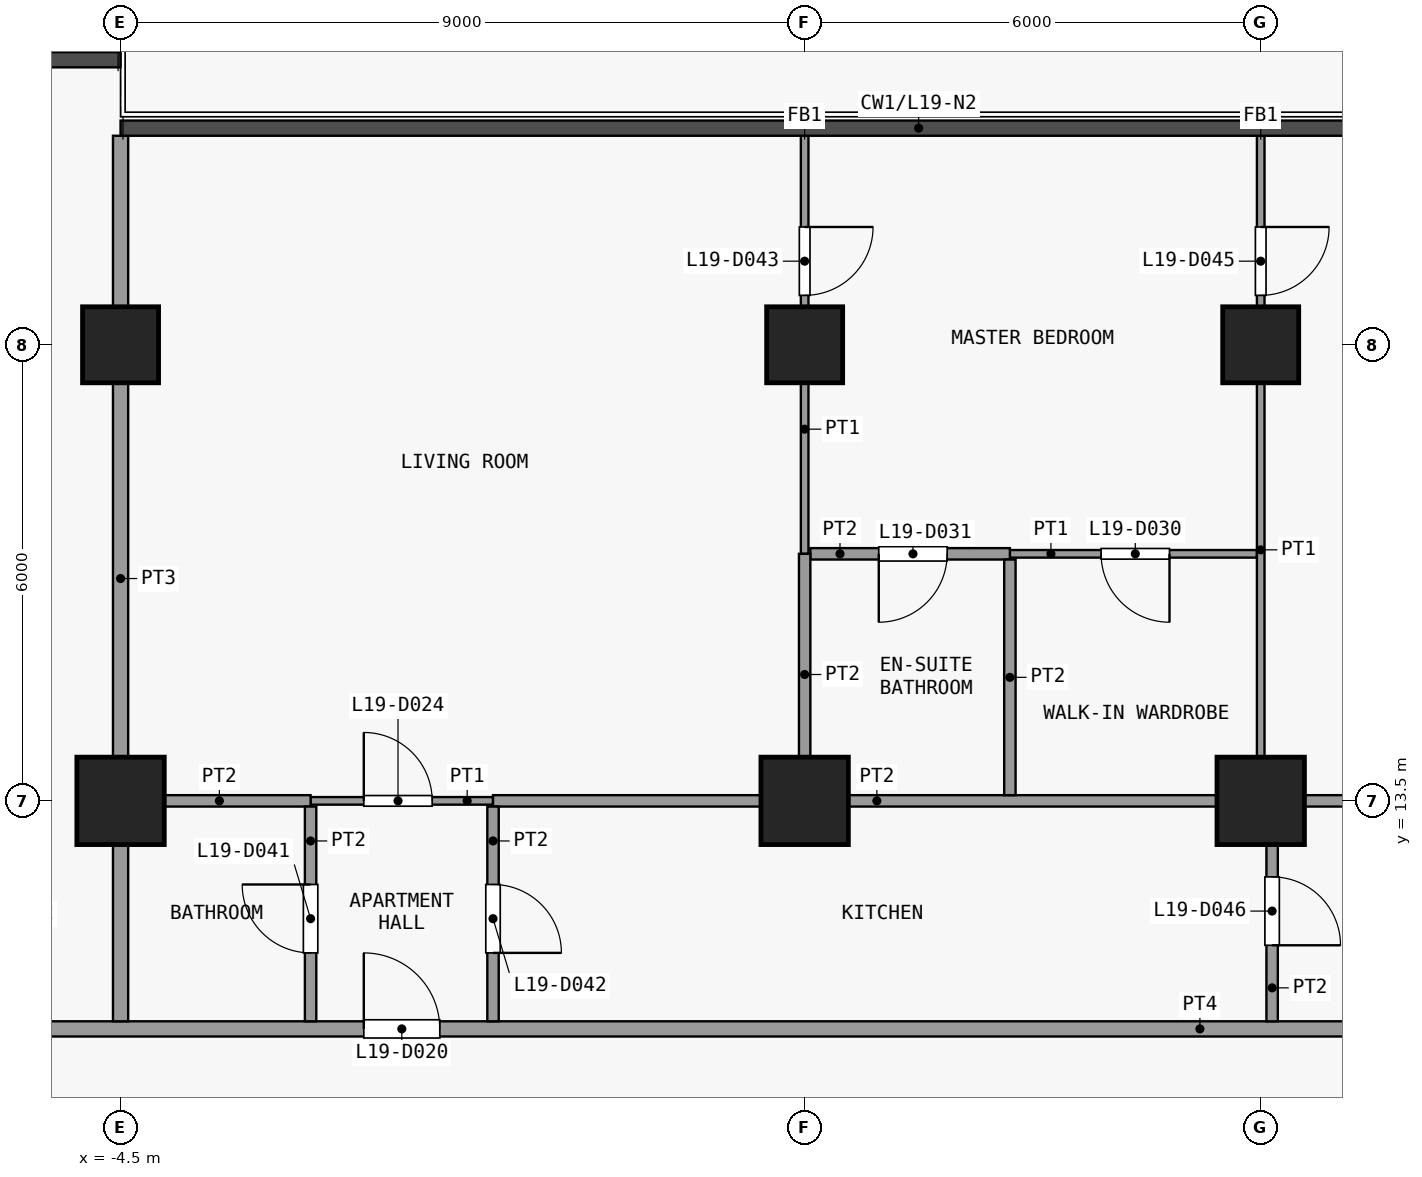
"""IFC4 building model, lengths in metres.
Left out: names, types, materials, properties, quantities, classifications, styles, units other than length and angle.
Written with IfcOpenShell. Run it as: python <this file> out.ifc"""

import sys

from ifc_helpers import new_model, si_unit, direction, frame, frame_2d, origin, origin_2d, place, context, subcontext, project, spatial, rectangle, extrude, element, fill, save


model = new_model("IFC4")
c1 = context("Model", 3, precision=1e-05, world=origin(), true_north=direction((0.0, 1.0)))
c2 = subcontext(c1, "Body", "Model", "MODEL_VIEW")
j1 = project(units=[si_unit("LENGTHUNIT", "METRE"), si_unit("PLANEANGLEUNIT", "RADIAN")], contexts=[c1])
p1 = place(None, origin())
s1 = spatial("IfcSite", under=j1, at=p1, CompositionType="ELEMENT")
p2 = place(p1, origin())
s2 = spatial("IfcBuilding", under=s1, at=p2, CompositionType="ELEMENT")
p3 = place(p2, frame((0.0, 0.0, 81.1)))
s3 = spatial("IfcBuildingStorey", under=s2, at=p3, CompositionType="ELEMENT", Elevation=81.1)
p4 = place(p3, frame((-4.5, 13.5, 0.0), z_axis=(0.0, 0.0, 1.0), x_axis=(1.0, 0.0, 0.0)))
e1 = element("IfcColumn", 1, at=p4, inside=s3, PredefinedType="COLUMN", context=c2, shape_type="SweptSolid", body=[
    extrude(rectangle(XDim=1.15, YDim=1.15, at=origin_2d()), origin(), (0.0, 0.0, 1.0), 3.6),
])
p5 = place(p3, frame((-4.5, 19.5, 0.0), z_axis=(0.0, 0.0, 1.0), x_axis=(1.0, 0.0, 0.0)))
e2 = element("IfcColumn", 2, at=p5, inside=s3, PredefinedType="COLUMN", context=c2, shape_type="SweptSolid", body=[
    extrude(rectangle(XDim=1.0, YDim=1.0, at=origin_2d()), origin(), (0.0, 0.0, 1.0), 3.6),
])
p6 = place(p3, frame((4.5, 13.5, 0.0), z_axis=(0.0, 0.0, 1.0), x_axis=(1.0, 0.0, 0.0)))
e3 = element("IfcColumn", 3, at=p6, inside=s3, PredefinedType="COLUMN", context=c2, shape_type="SweptSolid", body=[
    extrude(rectangle(XDim=1.15, YDim=1.15, at=origin_2d()), origin(), (0.0, 0.0, 1.0), 3.6),
])
p7 = place(p3, frame((4.5, 19.5, 0.0), z_axis=(0.0, 0.0, 1.0), x_axis=(1.0, 0.0, 0.0)))
e4 = element("IfcColumn", 4, at=p7, inside=s3, PredefinedType="COLUMN", context=c2, shape_type="SweptSolid", body=[
    extrude(rectangle(XDim=1.0, YDim=1.0, at=origin_2d()), origin(), (0.0, 0.0, 1.0), 3.6),
])
p8 = place(p3, frame((10.5, 13.5, 0.0), z_axis=(0.0, 0.0, 1.0), x_axis=(1.0, 0.0, 0.0)))
e5 = element("IfcColumn", 5, at=p8, inside=s3, PredefinedType="COLUMN", context=c2, shape_type="SweptSolid", body=[
    extrude(rectangle(XDim=1.15, YDim=1.15, at=origin_2d()), origin(), (0.0, 0.0, 1.0), 3.6),
])
p9 = place(p3, frame((10.5, 19.5, 0.0), z_axis=(0.0, 0.0, 1.0), x_axis=(1.0, 0.0, 0.0)))
e6 = element("IfcColumn", 6, at=p9, inside=s3, PredefinedType="COLUMN", context=c2, shape_type="SweptSolid", body=[
    extrude(rectangle(XDim=1.0, YDim=1.0, at=origin_2d()), origin(), (0.0, 0.0, 1.0), 3.6),
])
p10 = place(p3, frame((-23.85, 10.5, 0.0), z_axis=(0.0, 0.0, 1.0), x_axis=(1.0, 0.0, 0.0)))
e7 = element("IfcWall", 7, at=p10, inside=s3, PredefinedType="PARTITIONING", context=c2, shape_type="SweptSolid", body=[
    extrude(rectangle(XDim=49.2, YDim=0.2, at=frame_2d((24.6, 0.0))), origin(), (0.0, 0.0, 1.0), 3.3),
])
p11 = place(p10, frame((5.55, 0.0, 0.0)))
e8 = element("IfcOpeningElement", 8, at=p11, cuts=e7, PredefinedType="OPENING", context=c2, shape_type="SweptSolid", body=[
    extrude(rectangle(XDim=1.0, YDim=2.1, at=frame_2d((0.5, 1.05))), frame((0.0, 0.11, 0.0), z_axis=(0.0, -1.0, 0.0), x_axis=(1.0, 0.0, 0.0)), (0.0, 0.0, 1.0), 0.22),
])
p12 = place(p10, frame((14.05, 0.0, 0.0)))
e9 = element("IfcOpeningElement", 9, at=p12, cuts=e7, PredefinedType="OPENING", context=c2, shape_type="SweptSolid", body=[
    extrude(rectangle(XDim=1.0, YDim=2.1, at=frame_2d((0.5, 1.05))), frame((0.0, 0.11, 0.0), z_axis=(0.0, -1.0, 0.0), x_axis=(1.0, 0.0, 0.0)), (0.0, 0.0, 1.0), 0.22),
])
p13 = place(p10, frame((22.55, 0.0, 0.0)))
e10 = element("IfcOpeningElement", 10, at=p13, cuts=e7, PredefinedType="OPENING", context=c2, shape_type="SweptSolid", body=[
    extrude(rectangle(XDim=1.0, YDim=2.1, at=frame_2d((0.5, 1.05))), frame((0.0, 0.11, 0.0), z_axis=(0.0, -1.0, 0.0), x_axis=(1.0, 0.0, 0.0)), (0.0, 0.0, 1.0), 0.22),
])
p14 = place(p10, frame((43.55, 0.0, 0.0)))
e11 = element("IfcOpeningElement", 11, at=p14, cuts=e7, PredefinedType="OPENING", context=c2, shape_type="SweptSolid", body=[
    extrude(rectangle(XDim=1.0, YDim=2.1, at=frame_2d((0.5, 1.05))), frame((0.0, 0.11, 0.0), z_axis=(0.0, -1.0, 0.0), x_axis=(1.0, 0.0, 0.0)), (0.0, 0.0, 1.0), 0.22),
])
p15 = place(p3, frame((-2.0, 13.5, 0.0), z_axis=(0.0, 0.0, 1.0), x_axis=(1.0, 0.0, 0.0)))
e12 = element("IfcWall", 12, at=p15, inside=s3, PredefinedType="PARTITIONING", context=c2, shape_type="SweptSolid", body=[
    extrude(rectangle(XDim=2.4, YDim=0.1, at=frame_2d((1.2, 0.0))), origin(), (0.0, 0.0, 1.0), 3.3),
])
p16 = place(p15, frame((0.7, 0.0, 0.0)))
e13 = element("IfcOpeningElement", 13, at=p16, cuts=e12, PredefinedType="OPENING", context=c2, shape_type="SweptSolid", body=[
    extrude(rectangle(XDim=0.9, YDim=2.1, at=frame_2d((0.45, 1.05))), frame((0.0, 0.06, 0.0), z_axis=(0.0, -1.0, 0.0), x_axis=(1.0, 0.0, 0.0)), (0.0, 0.0, 1.0), 0.12),
])
p17 = place(p3, frame((-4.4, 13.5, 0.0), z_axis=(0.0, 0.0, 1.0), x_axis=(1.0, 0.0, 0.0)))
e14 = element("IfcWall", 14, at=p17, inside=s3, PredefinedType="PARTITIONING", context=c2, shape_type="SweptSolid", body=[
    extrude(rectangle(XDim=2.4, YDim=0.15, at=frame_2d((1.2, 0.0))), origin(), (0.0, 0.0, 1.0), 3.3),
])
p18 = place(p3, frame((0.4, 13.5, 0.0), z_axis=(0.0, 0.0, 1.0), x_axis=(1.0, 0.0, 0.0)))
e15 = element("IfcWall", 15, at=p18, inside=s3, PredefinedType="PARTITIONING", context=c2, shape_type="SweptSolid", body=[
    extrude(rectangle(XDim=10.1, YDim=0.15, at=frame_2d((5.05, 0.0))), origin(), (0.0, 0.0, 1.0), 3.3),
])
p19 = place(p3, frame((10.65, 13.5, 0.0), z_axis=(0.0, 0.0, 1.0), x_axis=(1.0, 0.0, 0.0)))
e16 = element("IfcWall", 16, at=p19, inside=s3, PredefinedType="PARTITIONING", context=c2, shape_type="SweptSolid", body=[
    extrude(rectangle(XDim=8.35, YDim=0.15, at=frame_2d((4.175, 0.0))), origin(), (0.0, 0.0, 1.0), 3.3),
])
p20 = place(p3, frame((7.2, 16.75, 0.0), z_axis=(0.0, 0.0, 1.0), x_axis=(1.0, 0.0, 0.0)))
e17 = element("IfcWall", 17, at=p20, inside=s3, PredefinedType="PARTITIONING", context=c2, shape_type="SweptSolid", body=[
    extrude(rectangle(XDim=3.25, YDim=0.1, at=frame_2d((1.625, 0.0))), origin(), (0.0, 0.0, 1.0), 3.3),
])
p21 = place(p20, frame((1.2, 0.0, 0.0)))
e18 = element("IfcOpeningElement", 18, at=p21, cuts=e17, PredefinedType="OPENING", context=c2, shape_type="SweptSolid", body=[
    extrude(rectangle(XDim=0.9, YDim=2.1, at=frame_2d((0.45, 1.05))), frame((0.0, 0.06, 0.0), z_axis=(0.0, -1.0, 0.0), x_axis=(1.0, 0.0, 0.0)), (0.0, 0.0, 1.0), 0.12),
])
p22 = place(p3, frame((4.575, 16.75, 0.0), z_axis=(0.0, 0.0, 1.0), x_axis=(1.0, 0.0, 0.0)))
e19 = element("IfcWall", 19, at=p22, inside=s3, PredefinedType="PARTITIONING", context=c2, shape_type="SweptSolid", body=[
    extrude(rectangle(XDim=2.625, YDim=0.15, at=frame_2d((1.312, 0.0))), origin(), (0.0, 0.0, 1.0), 3.3),
])
p23 = place(p22, frame((0.9, 0.0, 0.0)))
e20 = element("IfcOpeningElement", 20, at=p23, cuts=e19, PredefinedType="OPENING", context=c2, shape_type="SweptSolid", body=[
    extrude(rectangle(XDim=0.9, YDim=2.1, at=frame_2d((0.45, 1.05))), frame((0.0, 0.085, 0.0), z_axis=(0.0, -1.0, 0.0), x_axis=(1.0, 0.0, 0.0)), (0.0, 0.0, 1.0), 0.17),
])
p24 = place(p3, frame((-4.5, 10.6, 0.0), z_axis=(0.0, 0.0, 1.0), x_axis=(0.0, 1.0, 0.0)))
e21 = element("IfcWall", 21, at=p24, inside=s3, PredefinedType="PARTITIONING", context=c2, shape_type="SweptSolid", body=[
    extrude(rectangle(XDim=11.65, YDim=0.2, at=frame_2d((5.825, 0.0))), origin(), (0.0, 0.0, 1.0), 3.3),
])
p25 = place(p3, frame((-2.0, 10.6, 0.0), z_axis=(0.0, 0.0, 1.0), x_axis=(0.0, 1.0, 0.0)))
e22 = element("IfcWall", 22, at=p25, inside=s3, PredefinedType="PARTITIONING", context=c2, shape_type="SweptSolid", body=[
    extrude(rectangle(XDim=2.825, YDim=0.15, at=frame_2d((1.413, 0.0))), origin(), (0.0, 0.0, 1.0), 3.3),
])
p26 = place(p25, frame((0.9, 0.0, 0.0)))
e23 = element("IfcOpeningElement", 23, at=p26, cuts=e22, PredefinedType="OPENING", context=c2, shape_type="SweptSolid", body=[
    extrude(rectangle(XDim=0.9, YDim=2.1, at=frame_2d((0.45, 1.05))), frame((0.0, 0.085, 0.0), z_axis=(0.0, -1.0, 0.0), x_axis=(1.0, 0.0, 0.0)), (0.0, 0.0, 1.0), 0.17),
])
p27 = place(p3, frame((0.4, 10.6, 0.0), z_axis=(0.0, 0.0, 1.0), x_axis=(0.0, 1.0, 0.0)))
e24 = element("IfcWall", 24, at=p27, inside=s3, PredefinedType="PARTITIONING", context=c2, shape_type="SweptSolid", body=[
    extrude(rectangle(XDim=2.825, YDim=0.15, at=frame_2d((1.413, 0.0))), origin(), (0.0, 0.0, 1.0), 3.3),
])
p28 = place(p27, frame((0.9, 0.0, 0.0)))
e25 = element("IfcOpeningElement", 25, at=p28, cuts=e24, PredefinedType="OPENING", context=c2, shape_type="SweptSolid", body=[
    extrude(rectangle(XDim=0.9, YDim=2.1, at=frame_2d((0.45, 1.05))), frame((0.0, 0.085, 0.0), z_axis=(0.0, -1.0, 0.0), x_axis=(1.0, 0.0, 0.0)), (0.0, 0.0, 1.0), 0.17),
])
p29 = place(p3, frame((4.5, 16.75, 0.0), z_axis=(0.0, 0.0, 1.0), x_axis=(0.0, 1.0, 0.0)))
e26 = element("IfcWall", 26, at=p29, inside=s3, PredefinedType="PARTITIONING", context=c2, shape_type="SweptSolid", body=[
    extrude(rectangle(XDim=5.5, YDim=0.1, at=frame_2d((2.75, 0.0))), origin(), (0.0, 0.0, 1.0), 3.3),
])
p30 = place(p29, frame((3.4, 0.0, 0.0)))
e27 = element("IfcOpeningElement", 27, at=p30, cuts=e26, PredefinedType="OPENING", context=c2, shape_type="SweptSolid", body=[
    extrude(rectangle(XDim=0.9, YDim=2.1, at=frame_2d((0.45, 1.05))), frame((0.0, 0.06, 0.0), z_axis=(0.0, -1.0, 0.0), x_axis=(1.0, 0.0, 0.0)), (0.0, 0.0, 1.0), 0.12),
])
p31 = place(p3, frame((4.5, 13.575, 0.0), z_axis=(0.0, 0.0, 1.0), x_axis=(0.0, 1.0, 0.0)))
e28 = element("IfcWall", 28, at=p31, inside=s3, PredefinedType="PARTITIONING", context=c2, shape_type="SweptSolid", body=[
    extrude(rectangle(XDim=3.175, YDim=0.15, at=frame_2d((1.587, 0.0))), origin(), (0.0, 0.0, 1.0), 3.3),
])
p32 = place(p3, frame((7.2, 13.575, 0.0), z_axis=(0.0, 0.0, 1.0), x_axis=(0.0, 1.0, 0.0)))
e29 = element("IfcWall", 29, at=p32, inside=s3, PredefinedType="PARTITIONING", context=c2, shape_type="SweptSolid", body=[
    extrude(rectangle(XDim=3.1, YDim=0.15, at=frame_2d((1.55, 0.0))), origin(), (0.0, 0.0, 1.0), 3.3),
])
p33 = place(p3, frame((10.5, 13.575, 0.0), z_axis=(0.0, 0.0, 1.0), x_axis=(0.0, 1.0, 0.0)))
e30 = element("IfcWall", 30, at=p33, inside=s3, PredefinedType="PARTITIONING", context=c2, shape_type="SweptSolid", body=[
    extrude(rectangle(XDim=8.675, YDim=0.1, at=frame_2d((4.337, 0.0))), origin(), (0.0, 0.0, 1.0), 3.3),
])
p34 = place(p33, frame((6.575, 0.0, 0.0)))
e31 = element("IfcOpeningElement", 31, at=p34, cuts=e30, PredefinedType="OPENING", context=c2, shape_type="SweptSolid", body=[
    extrude(rectangle(XDim=0.9, YDim=2.1, at=frame_2d((0.45, 1.05))), frame((0.0, 0.06, 0.0), z_axis=(0.0, -1.0, 0.0), x_axis=(1.0, 0.0, 0.0)), (0.0, 0.0, 1.0), 0.12),
])
p35 = place(p3, frame((10.65, 10.6, 0.0), z_axis=(0.0, 0.0, 1.0), x_axis=(0.0, 1.0, 0.0)))
e32 = element("IfcWall", 32, at=p35, inside=s3, PredefinedType="PARTITIONING", context=c2, shape_type="SweptSolid", body=[
    extrude(rectangle(XDim=2.825, YDim=0.15, at=frame_2d((1.413, 0.0))), origin(), (0.0, 0.0, 1.0), 3.3),
])
p36 = place(p35, frame((1.0, 0.0, 0.0)))
e33 = element("IfcOpeningElement", 33, at=p36, cuts=e32, PredefinedType="OPENING", context=c2, shape_type="SweptSolid", body=[
    extrude(rectangle(XDim=0.9, YDim=2.1, at=frame_2d((0.45, 1.05))), frame((0.0, 0.085, 0.0), z_axis=(0.0, -1.0, 0.0), x_axis=(1.0, 0.0, 0.0)), (0.0, 0.0, 1.0), 0.17),
])
p37 = place(p13, origin())
e34 = element("IfcDoor", 34, at=p37, inside=s3, OperationType="SINGLE_SWING_RIGHT", PredefinedType="DOOR", context=c2, shape_type="SweptSolid", body=[
    extrude(rectangle(XDim=1.0, YDim=2.1, at=frame_2d((0.5, 1.05))), frame((0.0, 0.025, 0.0), z_axis=(0.0, -1.0, 0.0), x_axis=(1.0, 0.0, 0.0)), (0.0, 0.0, 1.0), 0.05),
])
fill(e10, e34)
p38 = place(p16, origin())
e35 = element("IfcDoor", 35, at=p38, inside=s3, OperationType="SINGLE_SWING_RIGHT", PredefinedType="DOOR", context=c2, shape_type="SweptSolid", body=[
    extrude(rectangle(XDim=0.9, YDim=2.1, at=frame_2d((0.45, 1.05))), frame((0.0, 0.025, 0.0), z_axis=(0.0, -1.0, 0.0), x_axis=(1.0, 0.0, 0.0)), (0.0, 0.0, 1.0), 0.05),
])
fill(e13, e35)
p39 = place(p21, origin())
e36 = element("IfcDoor", 36, at=p39, inside=s3, OperationType="SINGLE_SWING_RIGHT", PredefinedType="DOOR", context=c2, shape_type="SweptSolid", body=[
    extrude(rectangle(XDim=0.9, YDim=2.1, at=frame_2d((0.45, 1.05))), frame((0.0, 0.025, 0.0), z_axis=(0.0, -1.0, 0.0), x_axis=(1.0, 0.0, 0.0)), (0.0, 0.0, 1.0), 0.05),
])
fill(e18, e36)
p40 = place(p23, origin())
e37 = element("IfcDoor", 37, at=p40, inside=s3, OperationType="SINGLE_SWING_LEFT", PredefinedType="DOOR", context=c2, shape_type="SweptSolid", body=[
    extrude(rectangle(XDim=0.9, YDim=2.1, at=frame_2d((0.45, 1.05))), frame((0.0, 0.025, 0.0), z_axis=(0.0, -1.0, 0.0), x_axis=(1.0, 0.0, 0.0)), (0.0, 0.0, 1.0), 0.05),
])
fill(e20, e37)
p41 = place(p26, origin())
e38 = element("IfcDoor", 38, at=p41, inside=s3, OperationType="SINGLE_SWING_LEFT", PredefinedType="DOOR", context=c2, shape_type="SweptSolid", body=[
    extrude(rectangle(XDim=0.9, YDim=2.1, at=frame_2d((0.45, 1.05))), frame((0.0, 0.025, 0.0), z_axis=(0.0, -1.0, 0.0), x_axis=(1.0, 0.0, 0.0)), (0.0, 0.0, 1.0), 0.05),
])
fill(e23, e38)
p42 = place(p28, origin())
e39 = element("IfcDoor", 39, at=p42, inside=s3, OperationType="SINGLE_SWING_LEFT", PredefinedType="DOOR", context=c2, shape_type="SweptSolid", body=[
    extrude(rectangle(XDim=0.9, YDim=2.1, at=frame_2d((0.45, 1.05))), frame((0.0, 0.025, 0.0), z_axis=(0.0, -1.0, 0.0), x_axis=(1.0, 0.0, 0.0)), (0.0, 0.0, 1.0), 0.05),
])
fill(e25, e39)
p43 = place(p30, origin())
e40 = element("IfcDoor", 40, at=p43, inside=s3, OperationType="SINGLE_SWING_RIGHT", PredefinedType="DOOR", context=c2, shape_type="SweptSolid", body=[
    extrude(rectangle(XDim=0.9, YDim=2.1, at=frame_2d((0.45, 1.05))), frame((0.0, 0.025, 0.0), z_axis=(0.0, -1.0, 0.0), x_axis=(1.0, 0.0, 0.0)), (0.0, 0.0, 1.0), 0.05),
])
fill(e27, e40)
p44 = place(p34, origin())
e41 = element("IfcDoor", 41, at=p44, inside=s3, OperationType="SINGLE_SWING_RIGHT", PredefinedType="DOOR", context=c2, shape_type="SweptSolid", body=[
    extrude(rectangle(XDim=0.9, YDim=2.1, at=frame_2d((0.45, 1.05))), frame((0.0, 0.025, 0.0), z_axis=(0.0, -1.0, 0.0), x_axis=(1.0, 0.0, 0.0)), (0.0, 0.0, 1.0), 0.05),
])
fill(e31, e41)
p45 = place(p36, origin())
e42 = element("IfcDoor", 42, at=p45, inside=s3, OperationType="SINGLE_SWING_LEFT", PredefinedType="DOOR", context=c2, shape_type="SweptSolid", body=[
    extrude(rectangle(XDim=0.9, YDim=2.1, at=frame_2d((0.45, 1.05))), frame((0.0, 0.025, 0.0), z_axis=(0.0, -1.0, 0.0), x_axis=(1.0, 0.0, 0.0)), (0.0, 0.0, 1.0), 0.05),
])
fill(e33, e42)
save(model, sys.argv[1])
